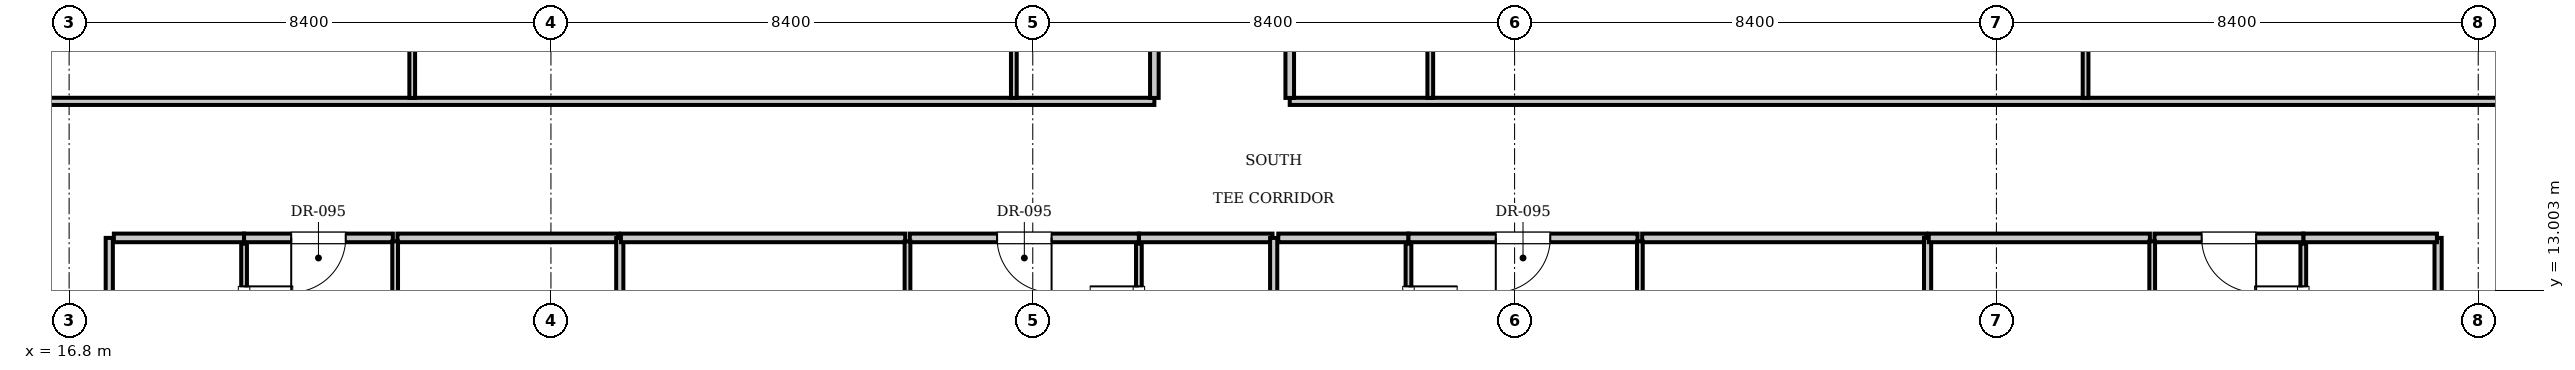
"""IFC4 building model, lengths in metres.
Left out: names, types, materials, properties, quantities, classifications, styles, units other than length and angle.
Written with IfcOpenShell. Run it as: python <this file> out.ifc"""

import sys

from ifc_helpers import new_model, si_unit, direction, frame, frame_2d, origin, place, context, subcontext, project, spatial, rectangle, extrude, element, fill, save


model = new_model("IFC4")
c1 = context("Model", 3, precision=1e-05, world=origin(), true_north=direction((0.0, 1.0)))
c2 = subcontext(c1, "Body", "Model", "MODEL_VIEW")
j1 = project(units=[si_unit("LENGTHUNIT", "METRE"), si_unit("PLANEANGLEUNIT", "RADIAN")], contexts=[c1])
p1 = place(None, origin())
s1 = spatial("IfcSite", under=j1, at=p1, CompositionType="ELEMENT")
p2 = place(p1, origin())
s2 = spatial("IfcBuilding", under=s1, at=p2, CompositionType="ELEMENT")
p3 = place(p2, frame((0.0, 0.0, 192.85)))
s3 = spatial("IfcBuildingStorey", under=s2, at=p3, CompositionType="ELEMENT", Elevation=192.85)
for number, where, z_axis, x_axis in (
    (1, (17.5, 9.0, 0.0), (0.0, 0.0, 1.0), (0.0, 1.0, 0.0)),
    (2, (58.1, 9.0, 0.0), (0.0, 0.0, 1.0), (0.0, 1.0, 0.0)),
):
    element("IfcWall", number, at=place(p3, frame(where, z_axis=z_axis, x_axis=x_axis)), inside=s3, PredefinedType="PARTITIONING", context=c2, shape_type="SweptSolid", body=[
        extrude(rectangle(XDim=4.92, YDim=0.125, at=frame_2d((2.46, 0.0))), origin(), (0.0, 0.0, 1.0), 3.61),
    ])
p4 = place(p3, frame((17.58, 13.92, 0.0), z_axis=(0.0, 0.0, 1.0), x_axis=(1.0, 0.0, 0.0)))
e3 = element("IfcWall", 3, at=p4, inside=s3, PredefinedType="PARTITIONING", context=c2, shape_type="SweptSolid", body=[
    extrude(rectangle(XDim=2.27, YDim=0.15, at=frame_2d((1.135, 0.0))), origin(), (0.0, 0.0, 1.0), 3.61),
])
p5 = place(p3, frame((19.85, 11.48, 0.0), z_axis=(0.0, 0.0, 1.0), x_axis=(0.0, 1.0, 0.0)))
e4 = element("IfcWall", 4, at=p5, inside=s3, PredefinedType="PARTITIONING", context=c2, shape_type="SweptSolid", body=[
    extrude(rectangle(XDim=2.34, YDim=0.1, at=frame_2d((1.17, 0.0))), origin(), (0.0, 0.0, 1.0), 3.61),
])
p6 = place(p5, frame((0.745, 0.0, 0.0)))
e5 = element("IfcOpeningElement", 5, at=p6, cuts=e4, PredefinedType="OPENING", context=c2, shape_type="SweptSolid", body=[
    extrude(rectangle(XDim=0.85, YDim=2.1, at=frame_2d((0.425, 1.05))), frame((0.0, 0.06, 0.0), z_axis=(0.0, -1.0, 0.0), x_axis=(1.0, 0.0, 0.0)), (0.0, 0.0, 1.0), 0.12),
])
p7 = place(p3, frame((19.85, 13.92, 0.0), z_axis=(0.0, 0.0, 1.0), x_axis=(1.0, 0.0, 0.0)))
e6 = element("IfcWall", 6, at=p7, inside=s3, PredefinedType="PARTITIONING", context=c2, shape_type="SweptSolid", body=[
    extrude(rectangle(XDim=2.594, YDim=0.15, at=frame_2d((1.297, 0.0))), origin(), (0.0, 0.0, 1.0), 3.61),
])
p8 = place(p7, frame((0.822, 0.0, 0.0)))
e7 = element("IfcOpeningElement", 7, at=p8, cuts=e6, PredefinedType="OPENING", context=c2, shape_type="SweptSolid", body=[
    extrude(rectangle(XDim=0.95, YDim=2.15, at=frame_2d((0.475, 1.075))), frame((0.0, 0.085, 0.0), z_axis=(0.0, -1.0, 0.0), x_axis=(1.0, 0.0, 0.0)), (0.0, 0.0, 1.0), 0.17),
])
p9 = place(p3, frame((22.524, 13.92, 0.0), z_axis=(0.0, 0.0, 1.0), x_axis=(1.0, 0.0, 0.0)))
e8 = element("IfcWall", 8, at=p9, inside=s3, PredefinedType="PARTITIONING", context=c2, shape_type="SweptSolid", body=[
    extrude(rectangle(XDim=3.856, YDim=0.15, at=frame_2d((1.928, 0.0))), origin(), (0.0, 0.0, 1.0), 3.61),
])
p10 = place(p3, frame((22.484, 4.63, 0.0), z_axis=(0.0, 0.0, 1.0), x_axis=(0.0, 1.0, 0.0)))
e9 = element("IfcWall", 9, at=p10, inside=s3, PredefinedType="PARTITIONING", context=c2, shape_type="SweptSolid", body=[
    extrude(rectangle(XDim=9.23, YDim=0.1, at=frame_2d((4.615, 0.0))), origin(), (0.0, 0.0, 1.0), 3.61),
])
p11 = place(p10, frame((1.6, 0.0, 0.0)))
e10 = element("IfcOpeningElement", 10, at=p11, cuts=e9, PredefinedType="OPENING", context=c2, shape_type="SweptSolid", body=[
    extrude(rectangle(XDim=0.9, YDim=2.1, at=frame_2d((0.45, 1.05))), frame((0.0, 0.06, 0.0), z_axis=(0.0, -1.0, 0.0), x_axis=(1.0, 0.0, 0.0)), (0.0, 0.0, 1.0), 0.12),
])
p12 = place(p3, frame((26.4, 4.7, 0.0), z_axis=(0.0, 0.0, 1.0), x_axis=(0.0, 1.0, 0.0)))
e11 = element("IfcWall", 11, at=p12, inside=s3, PredefinedType="PARTITIONING", context=c2, shape_type="SweptSolid", body=[
    extrude(rectangle(XDim=9.22, YDim=0.125, at=frame_2d((4.61, 0.0))), origin(), (0.0, 0.0, 1.0), 3.61),
])
p13 = place(p3, frame((35.45, 13.92, 0.0), z_axis=(0.0, 0.0, 1.0), x_axis=(1.0, 0.0, 0.0)))
e12 = element("IfcWall", 12, at=p13, inside=s3, PredefinedType="PARTITIONING", context=c2, shape_type="SweptSolid", body=[
    extrude(rectangle(XDim=2.33, YDim=0.15, at=frame_2d((1.165, 0.0))), origin(), (0.0, 0.0, 1.0), 3.61),
])
p14 = place(p3, frame((35.45, 11.48, 0.0), z_axis=(0.0, 0.0, 1.0), x_axis=(0.0, 1.0, 0.0)))
e13 = element("IfcWall", 13, at=p14, inside=s3, PredefinedType="PARTITIONING", context=c2, shape_type="SweptSolid", body=[
    extrude(rectangle(XDim=2.34, YDim=0.1, at=frame_2d((1.17, 0.0))), origin(), (0.0, 0.0, 1.0), 3.61),
])
p15 = place(p14, frame((0.745, 0.0, 0.0)))
e14 = element("IfcOpeningElement", 14, at=p15, cuts=e13, PredefinedType="OPENING", context=c2, shape_type="SweptSolid", body=[
    extrude(rectangle(XDim=0.85, YDim=2.1, at=frame_2d((0.425, 1.05))), frame((0.0, 0.06, 0.0), z_axis=(0.0, -1.0, 0.0), x_axis=(1.0, 0.0, 0.0)), (0.0, 0.0, 1.0), 0.12),
])
p16 = place(p3, frame((26.42, 13.92, 0.0), z_axis=(0.0, 0.0, 1.0), x_axis=(1.0, 0.0, 0.0)))
e15 = element("IfcWall", 15, at=p16, inside=s3, PredefinedType="PARTITIONING", context=c2, shape_type="SweptSolid", body=[
    extrude(rectangle(XDim=4.956, YDim=0.15, at=frame_2d((2.478, 0.0))), origin(), (0.0, 0.0, 1.0), 3.61),
])
p17 = place(p3, frame((31.456, 13.92, 0.0), z_axis=(0.0, 0.0, 1.0), x_axis=(1.0, 0.0, 0.0)))
e16 = element("IfcWall", 16, at=p17, inside=s3, PredefinedType="PARTITIONING", context=c2, shape_type="SweptSolid", body=[
    extrude(rectangle(XDim=3.994, YDim=0.15, at=frame_2d((1.997, 0.0))), origin(), (0.0, 0.0, 1.0), 3.61),
])
p18 = place(p17, frame((1.522, 0.0, 0.0)))
e17 = element("IfcOpeningElement", 17, at=p18, cuts=e16, PredefinedType="OPENING", context=c2, shape_type="SweptSolid", body=[
    extrude(rectangle(XDim=0.95, YDim=2.15, at=frame_2d((0.475, 1.075))), frame((0.0, 0.085, 0.0), z_axis=(0.0, -1.0, 0.0), x_axis=(1.0, 0.0, 0.0)), (0.0, 0.0, 1.0), 0.17),
])
p19 = place(p3, frame((31.416, 4.63, 0.0), z_axis=(0.0, 0.0, 1.0), x_axis=(0.0, 1.0, 0.0)))
e18 = element("IfcWall", 18, at=p19, inside=s3, PredefinedType="PARTITIONING", context=c2, shape_type="SweptSolid", body=[
    extrude(rectangle(XDim=9.23, YDim=0.1, at=frame_2d((4.615, 0.0))), origin(), (0.0, 0.0, 1.0), 3.61),
])
p20 = place(p19, frame((1.6, 0.0, 0.0)))
e19 = element("IfcOpeningElement", 19, at=p20, cuts=e18, PredefinedType="OPENING", context=c2, shape_type="SweptSolid", body=[
    extrude(rectangle(XDim=0.9, YDim=2.1, at=frame_2d((0.45, 1.05))), frame((0.0, 0.06, 0.0), z_axis=(0.0, -1.0, 0.0), x_axis=(1.0, 0.0, 0.0)), (0.0, 0.0, 1.0), 0.12),
])
p21 = place(p3, frame((37.8, 4.7, 0.0), z_axis=(0.0, 0.0, 1.0), x_axis=(0.0, 1.0, 0.0)))
e20 = element("IfcWall", 20, at=p21, inside=s3, PredefinedType="PARTITIONING", context=c2, shape_type="SweptSolid", body=[
    extrude(rectangle(XDim=9.22, YDim=0.125, at=frame_2d((4.61, 0.0))), origin(), (0.0, 0.0, 1.0), 3.3),
])
p22 = place(p3, frame((37.88, 13.92, 0.0), z_axis=(0.0, 0.0, 1.0), x_axis=(1.0, 0.0, 0.0)))
e21 = element("IfcWall", 21, at=p22, inside=s3, PredefinedType="PARTITIONING", context=c2, shape_type="SweptSolid", body=[
    extrude(rectangle(XDim=2.27, YDim=0.15, at=frame_2d((1.135, 0.0))), origin(), (0.0, 0.0, 1.0), 3.61),
])
p23 = place(p3, frame((40.15, 11.48, 0.0), z_axis=(0.0, 0.0, 1.0), x_axis=(0.0, 1.0, 0.0)))
e22 = element("IfcWall", 22, at=p23, inside=s3, PredefinedType="PARTITIONING", context=c2, shape_type="SweptSolid", body=[
    extrude(rectangle(XDim=2.34, YDim=0.1, at=frame_2d((1.17, 0.0))), origin(), (0.0, 0.0, 1.0), 3.61),
])
p24 = place(p23, frame((0.745, 0.0, 0.0)))
e23 = element("IfcOpeningElement", 23, at=p24, cuts=e22, PredefinedType="OPENING", context=c2, shape_type="SweptSolid", body=[
    extrude(rectangle(XDim=0.85, YDim=2.1, at=frame_2d((0.425, 1.05))), frame((0.0, 0.06, 0.0), z_axis=(0.0, -1.0, 0.0), x_axis=(1.0, 0.0, 0.0)), (0.0, 0.0, 1.0), 0.12),
])
p25 = place(p3, frame((40.15, 13.92, 0.0), z_axis=(0.0, 0.0, 1.0), x_axis=(1.0, 0.0, 0.0)))
e24 = element("IfcWall", 24, at=p25, inside=s3, PredefinedType="PARTITIONING", context=c2, shape_type="SweptSolid", body=[
    extrude(rectangle(XDim=3.994, YDim=0.15, at=frame_2d((1.997, 0.0))), origin(), (0.0, 0.0, 1.0), 3.61),
])
p26 = place(p25, frame((1.522, 0.0, 0.0)))
e25 = element("IfcOpeningElement", 25, at=p26, cuts=e24, PredefinedType="OPENING", context=c2, shape_type="SweptSolid", body=[
    extrude(rectangle(XDim=0.95, YDim=2.15, at=frame_2d((0.475, 1.075))), frame((0.0, 0.085, 0.0), z_axis=(0.0, -1.0, 0.0), x_axis=(1.0, 0.0, 0.0)), (0.0, 0.0, 1.0), 0.17),
])
p27 = place(p3, frame((44.224, 13.92, 0.0), z_axis=(0.0, 0.0, 1.0), x_axis=(1.0, 0.0, 0.0)))
e26 = element("IfcWall", 26, at=p27, inside=s3, PredefinedType="PARTITIONING", context=c2, shape_type="SweptSolid", body=[
    extrude(rectangle(XDim=4.956, YDim=0.15, at=frame_2d((2.478, 0.0))), origin(), (0.0, 0.0, 1.0), 3.61),
])
p28 = place(p3, frame((44.184, 4.63, 0.0), z_axis=(0.0, 0.0, 1.0), x_axis=(0.0, 1.0, 0.0)))
e27 = element("IfcWall", 27, at=p28, inside=s3, PredefinedType="PARTITIONING", context=c2, shape_type="SweptSolid", body=[
    extrude(rectangle(XDim=9.23, YDim=0.1, at=frame_2d((4.615, 0.0))), origin(), (0.0, 0.0, 1.0), 3.61),
])
p29 = place(p28, frame((1.6, 0.0, 0.0)))
e28 = element("IfcOpeningElement", 28, at=p29, cuts=e27, PredefinedType="OPENING", context=c2, shape_type="SweptSolid", body=[
    extrude(rectangle(XDim=0.9, YDim=2.1, at=frame_2d((0.45, 1.05))), frame((0.0, 0.06, 0.0), z_axis=(0.0, -1.0, 0.0), x_axis=(1.0, 0.0, 0.0)), (0.0, 0.0, 1.0), 0.12),
])
p30 = place(p3, frame((49.2, 4.7, 0.0), z_axis=(0.0, 0.0, 1.0), x_axis=(0.0, 1.0, 0.0)))
e29 = element("IfcWall", 29, at=p30, inside=s3, PredefinedType="PARTITIONING", context=c2, shape_type="SweptSolid", body=[
    extrude(rectangle(XDim=9.22, YDim=0.125, at=frame_2d((4.61, 0.0))), origin(), (0.0, 0.0, 1.0), 3.61),
])
p31 = place(p3, frame((55.75, 13.92, 0.0), z_axis=(0.0, 0.0, 1.0), x_axis=(1.0, 0.0, 0.0)))
e30 = element("IfcWall", 30, at=p31, inside=s3, PredefinedType="PARTITIONING", context=c2, shape_type="SweptSolid", body=[
    extrude(rectangle(XDim=2.33, YDim=0.15, at=frame_2d((1.165, 0.0))), origin(), (0.0, 0.0, 1.0), 3.61),
])
p32 = place(p3, frame((55.75, 11.48, 0.0), z_axis=(0.0, 0.0, 1.0), x_axis=(0.0, 1.0, 0.0)))
e31 = element("IfcWall", 31, at=p32, inside=s3, PredefinedType="PARTITIONING", context=c2, shape_type="SweptSolid", body=[
    extrude(rectangle(XDim=2.34, YDim=0.1, at=frame_2d((1.17, 0.0))), origin(), (0.0, 0.0, 1.0), 3.61),
])
p33 = place(p32, frame((0.745, 0.0, 0.0)))
e32 = element("IfcOpeningElement", 32, at=p33, cuts=e31, PredefinedType="OPENING", context=c2, shape_type="SweptSolid", body=[
    extrude(rectangle(XDim=0.85, YDim=2.1, at=frame_2d((0.425, 1.05))), frame((0.0, 0.06, 0.0), z_axis=(0.0, -1.0, 0.0), x_axis=(1.0, 0.0, 0.0)), (0.0, 0.0, 1.0), 0.12),
])
p34 = place(p3, frame((49.22, 13.92, 0.0), z_axis=(0.0, 0.0, 1.0), x_axis=(1.0, 0.0, 0.0)))
e33 = element("IfcWall", 33, at=p34, inside=s3, PredefinedType="PARTITIONING", context=c2, shape_type="SweptSolid", body=[
    extrude(rectangle(XDim=3.856, YDim=0.15, at=frame_2d((1.928, 0.0))), origin(), (0.0, 0.0, 1.0), 3.61),
])
p35 = place(p3, frame((53.156, 13.92, 0.0), z_axis=(0.0, 0.0, 1.0), x_axis=(1.0, 0.0, 0.0)))
e34 = element("IfcWall", 34, at=p35, inside=s3, PredefinedType="PARTITIONING", context=c2, shape_type="SweptSolid", body=[
    extrude(rectangle(XDim=2.594, YDim=0.15, at=frame_2d((1.297, 0.0))), origin(), (0.0, 0.0, 1.0), 3.61),
])
p36 = place(p35, frame((0.822, 0.0, 0.0)))
e35 = element("IfcOpeningElement", 35, at=p36, cuts=e34, PredefinedType="OPENING", context=c2, shape_type="SweptSolid", body=[
    extrude(rectangle(XDim=0.95, YDim=2.15, at=frame_2d((0.475, 1.075))), frame((0.0, 0.085, 0.0), z_axis=(0.0, -1.0, 0.0), x_axis=(1.0, 0.0, 0.0)), (0.0, 0.0, 1.0), 0.17),
])
p37 = place(p3, frame((53.116, 4.63, 0.0), z_axis=(0.0, 0.0, 1.0), x_axis=(0.0, 1.0, 0.0)))
e36 = element("IfcWall", 36, at=p37, inside=s3, PredefinedType="PARTITIONING", context=c2, shape_type="SweptSolid", body=[
    extrude(rectangle(XDim=9.23, YDim=0.1, at=frame_2d((4.615, 0.0))), origin(), (0.0, 0.0, 1.0), 3.61),
])
p38 = place(p37, frame((1.6, 0.0, 0.0)))
e37 = element("IfcOpeningElement", 37, at=p38, cuts=e36, PredefinedType="OPENING", context=c2, shape_type="SweptSolid", body=[
    extrude(rectangle(XDim=0.9, YDim=2.1, at=frame_2d((0.45, 1.05))), frame((0.0, 0.06, 0.0), z_axis=(0.0, -1.0, 0.0), x_axis=(1.0, 0.0, 0.0)), (0.0, 0.0, 1.0), 0.12),
])
p39 = place(p3, frame((13.2, 16.3, 0.0), z_axis=(0.0, 0.0, 1.0), x_axis=(1.0, 0.0, 0.0)))
e38 = element("IfcWall", 38, at=p39, inside=s3, PredefinedType="PARTITIONING", context=c2, shape_type="SweptSolid", body=[
    extrude(rectangle(XDim=22.52, YDim=0.125, at=frame_2d((11.26, 0.0))), origin(), (0.0, 0.0, 1.0), 3.61),
])
p40 = place(p3, frame((38.08, 16.3, 0.0), z_axis=(0.0, 0.0, 1.0), x_axis=(1.0, 0.0, 0.0)))
e39 = element("IfcWall", 39, at=p40, inside=s3, PredefinedType="PARTITIONING", context=c2, shape_type="SweptSolid", body=[
    extrude(rectangle(XDim=24.32, YDim=0.125, at=frame_2d((12.16, 0.0))), origin(), (0.0, 0.0, 1.0), 3.61),
])
p41 = place(p3, frame((35.72, 16.36, 0.0), z_axis=(0.0, 0.0, 1.0), x_axis=(0.0, 1.0, 0.0)))
e40 = element("IfcWall", 40, at=p41, inside=s3, PredefinedType="PARTITIONING", context=c2, shape_type="SweptSolid", body=[
    extrude(rectangle(XDim=1.89, YDim=0.15, at=frame_2d((0.945, 0.0))), origin(), (0.0, 0.0, 1.0), 3.61),
])
p42 = place(p3, frame((33.27, 16.36, 0.0), z_axis=(0.0, 0.0, 1.0), x_axis=(0.0, 1.0, 0.0)))
e41 = element("IfcWall", 41, at=p42, inside=s3, PredefinedType="PARTITIONING", context=c2, shape_type="SweptSolid", body=[
    extrude(rectangle(XDim=1.89, YDim=0.1, at=frame_2d((0.945, 0.0))), origin(), (0.0, 0.0, 1.0), 3.61),
])
p43 = place(p3, frame((22.781, 16.36, 0.0), z_axis=(0.0, 0.0, 1.0), x_axis=(0.0, 1.0, 0.0)))
e42 = element("IfcWall", 42, at=p43, inside=s3, PredefinedType="PARTITIONING", context=c2, shape_type="SweptSolid", body=[
    extrude(rectangle(XDim=3.58, YDim=0.1, at=frame_2d((1.79, 0.0))), origin(), (0.0, 0.0, 1.0), 3.61),
])
p44 = place(p43, frame((1.34, 0.0, 0.0)))
e43 = element("IfcOpeningElement", 43, at=p44, cuts=e42, PredefinedType="OPENING", context=c2, shape_type="SweptSolid", body=[
    extrude(rectangle(XDim=0.9, YDim=2.1, at=frame_2d((0.45, 1.05))), frame((0.0, 0.06, 0.0), z_axis=(0.0, -1.0, 0.0), x_axis=(1.0, 0.0, 0.0)), (0.0, 0.0, 1.0), 0.12),
])
p45 = place(p3, frame((38.08, 16.36, 0.0), z_axis=(0.0, 0.0, 1.0), x_axis=(0.0, 1.0, 0.0)))
e44 = element("IfcWall", 44, at=p45, inside=s3, PredefinedType="PARTITIONING", context=c2, shape_type="SweptSolid", body=[
    extrude(rectangle(XDim=1.89, YDim=0.15, at=frame_2d((0.945, 0.0))), origin(), (0.0, 0.0, 1.0), 3.61),
])
p46 = place(p3, frame((40.53, 16.36, 0.0), z_axis=(0.0, 0.0, 1.0), x_axis=(0.0, 1.0, 0.0)))
e45 = element("IfcWall", 45, at=p46, inside=s3, PredefinedType="PARTITIONING", context=c2, shape_type="SweptSolid", body=[
    extrude(rectangle(XDim=1.89, YDim=0.1, at=frame_2d((0.945, 0.0))), origin(), (0.0, 0.0, 1.0), 3.61),
])
p47 = place(p3, frame((51.954, 16.36, 0.0), z_axis=(0.0, 0.0, 1.0), x_axis=(0.0, 1.0, 0.0)))
e46 = element("IfcWall", 46, at=p47, inside=s3, PredefinedType="PARTITIONING", context=c2, shape_type="SweptSolid", body=[
    extrude(rectangle(XDim=3.58, YDim=0.1, at=frame_2d((1.79, 0.0))), origin(), (0.0, 0.0, 1.0), 3.61),
])
p48 = place(p47, frame((2.42, 0.0, 0.0)))
e47 = element("IfcOpeningElement", 47, at=p48, cuts=e46, PredefinedType="OPENING", context=c2, shape_type="SweptSolid", body=[
    extrude(rectangle(XDim=0.9, YDim=2.1, at=frame_2d((0.45, 1.05))), frame((0.0, 0.06, 0.0), z_axis=(0.0, -1.0, 0.0), x_axis=(1.0, 0.0, 0.0)), (0.0, 0.0, 1.0), 0.12),
])
p49 = place(p6, frame((0.85, 0.0, 0.0), z_axis=(0.0, 0.0, 1.0), x_axis=(-1.0, 0.0, 0.0)))
e48 = element("IfcDoor", 48, at=p49, inside=s3, OperationType="SINGLE_SWING_LEFT", PredefinedType="DOOR", context=c2, shape_type="SweptSolid", body=[
    extrude(rectangle(XDim=0.85, YDim=2.1, at=frame_2d((0.425, 1.05))), frame((0.0, 0.025, 0.0), z_axis=(0.0, -1.0, 0.0), x_axis=(1.0, 0.0, 0.0)), (0.0, 0.0, 1.0), 0.05),
])
fill(e5, e48)
p50 = place(p8, frame((0.95, 0.0, 0.0), z_axis=(0.0, 0.0, 1.0), x_axis=(-1.0, 0.0, 0.0)))
e49 = element("IfcDoor", 49, at=p50, inside=s3, OperationType="SINGLE_SWING_RIGHT", PredefinedType="DOOR", context=c2, shape_type="SweptSolid", body=[
    extrude(rectangle(XDim=0.95, YDim=2.15, at=frame_2d((0.475, 1.075))), frame((0.0, 0.025, 0.0), z_axis=(0.0, -1.0, 0.0), x_axis=(1.0, 0.0, 0.0)), (0.0, 0.0, 1.0), 0.05),
])
fill(e7, e49)
p51 = place(p15, origin())
e50 = element("IfcDoor", 50, at=p51, inside=s3, OperationType="SINGLE_SWING_RIGHT", PredefinedType="DOOR", context=c2, shape_type="SweptSolid", body=[
    extrude(rectangle(XDim=0.85, YDim=2.1, at=frame_2d((0.425, 1.05))), frame((0.0, 0.025, 0.0), z_axis=(0.0, -1.0, 0.0), x_axis=(1.0, 0.0, 0.0)), (0.0, 0.0, 1.0), 0.05),
])
fill(e14, e50)
p52 = place(p18, frame((0.95, 0.0, 0.0), z_axis=(0.0, 0.0, 1.0), x_axis=(-1.0, 0.0, 0.0)))
e51 = element("IfcDoor", 51, at=p52, inside=s3, OperationType="SINGLE_SWING_LEFT", PredefinedType="DOOR", context=c2, shape_type="SweptSolid", body=[
    extrude(rectangle(XDim=0.95, YDim=2.15, at=frame_2d((0.475, 1.075))), frame((0.0, 0.025, 0.0), z_axis=(0.0, -1.0, 0.0), x_axis=(1.0, 0.0, 0.0)), (0.0, 0.0, 1.0), 0.05),
])
fill(e17, e51)
p53 = place(p24, frame((0.85, 0.0, 0.0), z_axis=(0.0, 0.0, 1.0), x_axis=(-1.0, 0.0, 0.0)))
e52 = element("IfcDoor", 52, at=p53, inside=s3, OperationType="SINGLE_SWING_LEFT", PredefinedType="DOOR", context=c2, shape_type="SweptSolid", body=[
    extrude(rectangle(XDim=0.85, YDim=2.1, at=frame_2d((0.425, 1.05))), frame((0.0, 0.025, 0.0), z_axis=(0.0, -1.0, 0.0), x_axis=(1.0, 0.0, 0.0)), (0.0, 0.0, 1.0), 0.05),
])
fill(e23, e52)
p54 = place(p26, frame((0.95, 0.0, 0.0), z_axis=(0.0, 0.0, 1.0), x_axis=(-1.0, 0.0, 0.0)))
e53 = element("IfcDoor", 53, at=p54, inside=s3, OperationType="SINGLE_SWING_RIGHT", PredefinedType="DOOR", context=c2, shape_type="SweptSolid", body=[
    extrude(rectangle(XDim=0.95, YDim=2.15, at=frame_2d((0.475, 1.075))), frame((0.0, 0.025, 0.0), z_axis=(0.0, -1.0, 0.0), x_axis=(1.0, 0.0, 0.0)), (0.0, 0.0, 1.0), 0.05),
])
fill(e25, e53)
p55 = place(p33, origin())
e54 = element("IfcDoor", 54, at=p55, inside=s3, OperationType="SINGLE_SWING_RIGHT", PredefinedType="DOOR", context=c2, shape_type="SweptSolid", body=[
    extrude(rectangle(XDim=0.85, YDim=2.1, at=frame_2d((0.425, 1.05))), frame((0.0, 0.025, 0.0), z_axis=(0.0, -1.0, 0.0), x_axis=(1.0, 0.0, 0.0)), (0.0, 0.0, 1.0), 0.05),
])
fill(e32, e54)
p56 = place(p36, frame((0.95, 0.0, 0.0), z_axis=(0.0, 0.0, 1.0), x_axis=(-1.0, 0.0, 0.0)))
e55 = element("IfcDoor", 55, at=p56, inside=s3, OperationType="SINGLE_SWING_LEFT", PredefinedType="DOOR", context=c2, shape_type="SweptSolid", body=[
    extrude(rectangle(XDim=0.95, YDim=2.15, at=frame_2d((0.475, 1.075))), frame((0.0, 0.025, 0.0), z_axis=(0.0, -1.0, 0.0), x_axis=(1.0, 0.0, 0.0)), (0.0, 0.0, 1.0), 0.05),
])
fill(e35, e55)
save(model, sys.argv[1])
